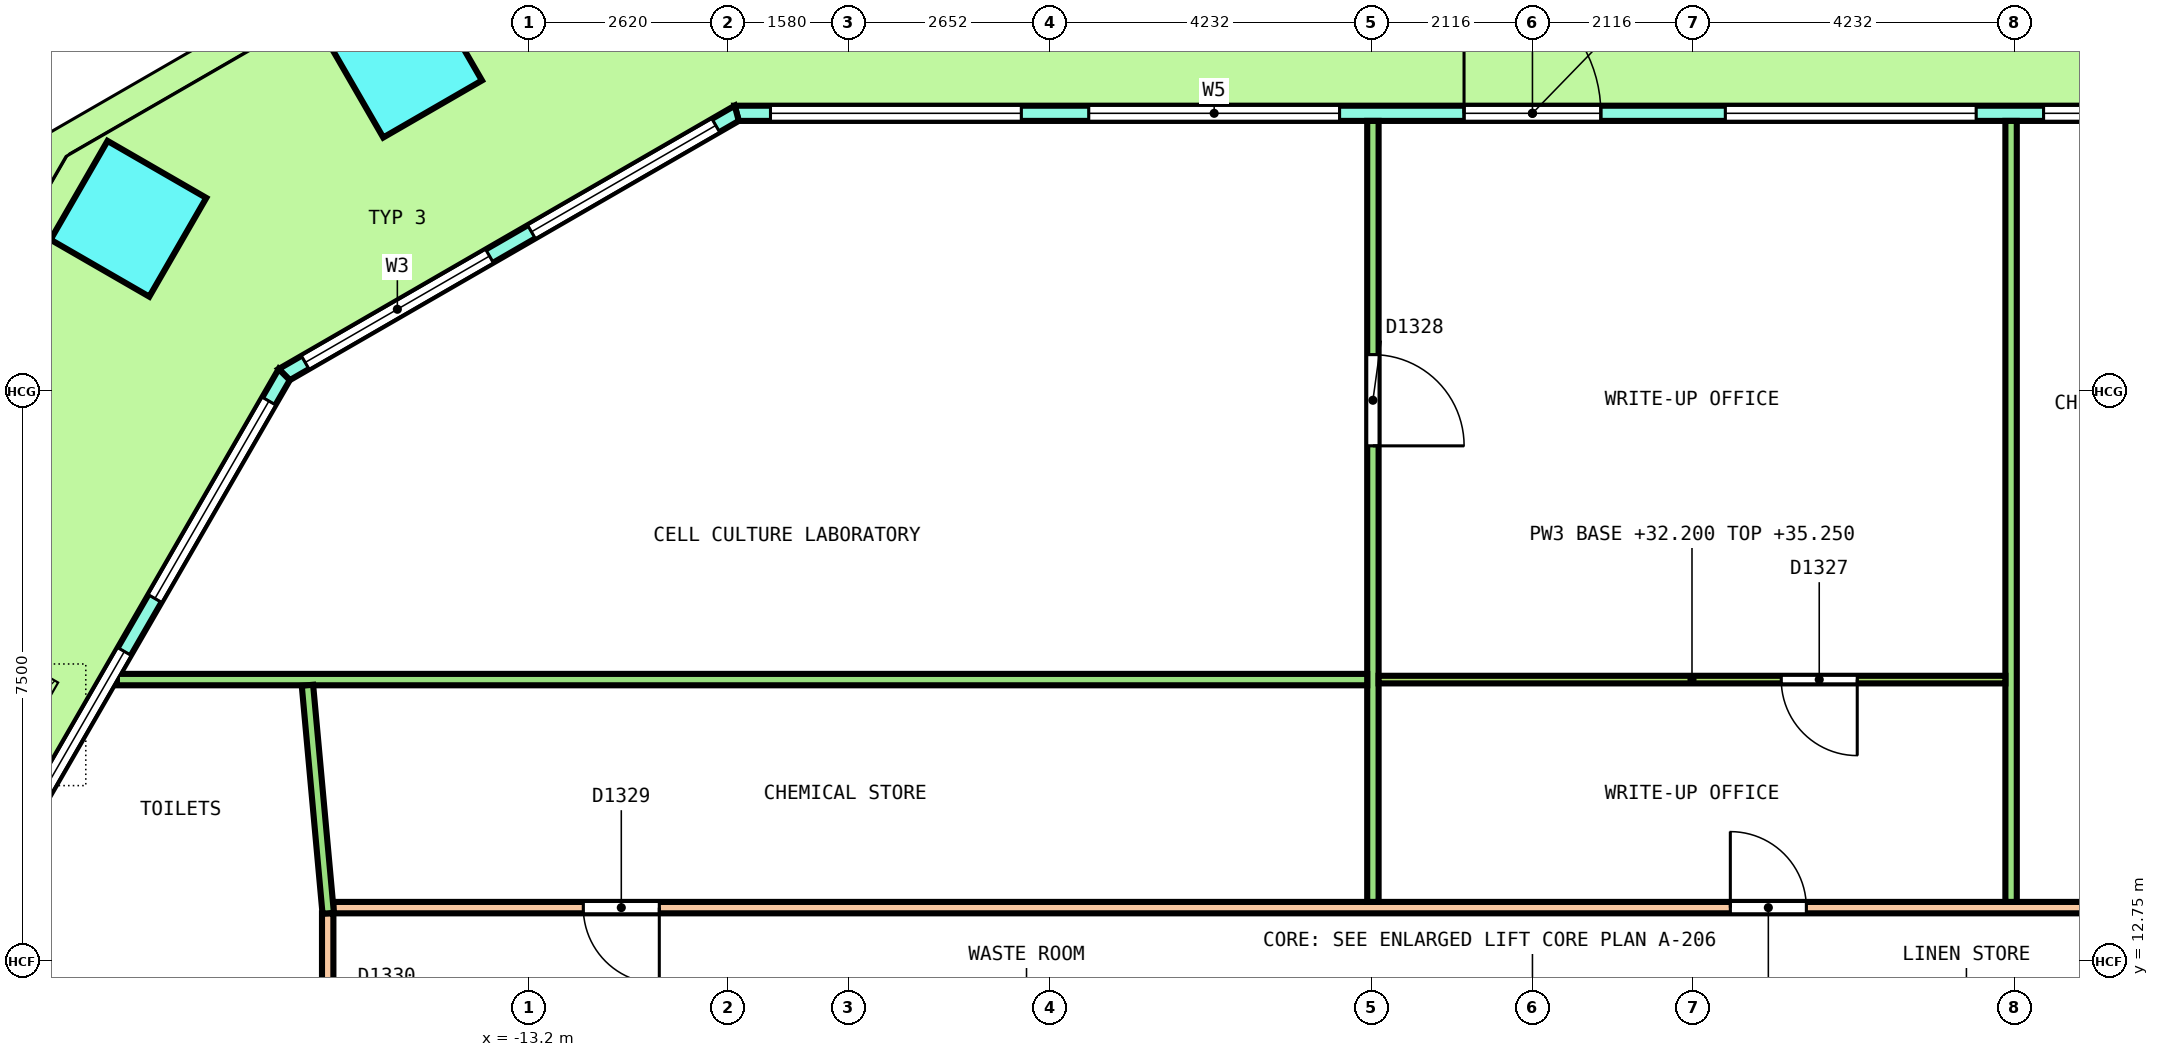
"""IFC4 building model, lengths in metres.
Left out: names, types, materials, properties, quantities, classifications, styles, units other than length and angle.
Written with IfcOpenShell. Run it as: python <this file> out.ifc"""

import sys

from ifc_helpers import new_model, si_unit, direction, frame, frame_2d, origin, origin_2d, place, context, subcontext, project, spatial, polyline, rectangle, outline, extrude, element, fill, save


model = new_model("IFC4")
c1 = context("Model", 3, precision=1e-05, world=origin(), true_north=direction((0.0, 1.0)))
c2 = subcontext(c1, "Body", "Model", "MODEL_VIEW")
j1 = project(units=[si_unit("LENGTHUNIT", "METRE"), si_unit("PLANEANGLEUNIT", "RADIAN")], contexts=[c1])
p1 = place(None, origin())
s1 = spatial("IfcSite", under=j1, at=p1, CompositionType="ELEMENT")
p2 = place(p1, origin())
s2 = spatial("IfcBuilding", under=s1, at=p2, CompositionType="ELEMENT")
p3 = place(p2, frame((0.0, 0.0, 32.2)))
s3 = spatial("IfcBuildingStorey", under=s2, at=p3, CompositionType="ELEMENT", Elevation=32.2)
for number, where, z_axis, x_axis in (
    (1, (-14.845, 24.606, 0.0), (-0.036, 0.0, 0.999), (-0.865, -0.5, -0.031)),
    (2, (-18.472, 22.512, 0.0), (-0.036, 0.0, 0.999), (-0.499, -0.866, -0.018)),
):
    element("IfcColumn", number, at=place(p3, frame(where, z_axis=z_axis, x_axis=x_axis)), inside=s3, PredefinedType="COLUMN", context=c2, shape_type="SweptSolid", body=[
        extrude(rectangle(XDim=1.5, YDim=1.5, at=origin_2d()), origin(), (0.0, 0.0, 1.0), 4.053),
    ])
p4 = place(p3, frame((10.468, 23.9, 0.0), z_axis=(0.0, 0.0, 1.0), x_axis=(-1.0, 0.0, 0.0)))
e3 = element("IfcWall", 3, at=p4, inside=s3, PredefinedType="SOLIDWALL", context=c2, shape_type="SweptSolid", body=[
    extrude(outline(polyline([(-0.027, -0.1), (1.023, -0.1), (2.072, -0.1), (3.122, -0.1), (4.171, -0.1), (5.221, -0.1), (6.27, -0.1), (7.32, -0.1), (8.369, -0.1), (9.419, -0.1), (10.468, -0.1), (11.518, -0.1), (12.567, -0.1), (13.617, -0.1), (14.666, -0.1), (15.716, -0.1), (16.765, -0.1), (17.815, -0.1), (18.864, -0.1), (19.914, -0.1), (20.963, -0.1), (20.91, 0.1), (19.865, 0.1), (18.821, 0.1), (17.777, 0.1), (16.733, 0.1), (15.689, 0.1), (14.645, 0.1), (13.601, 0.1), (12.557, 0.1), (11.512, 0.1), (10.468, 0.1), (9.424, 0.1), (8.38, 0.1), (7.336, 0.1), (6.292, 0.1), (5.248, 0.1), (4.203, 0.1), (3.159, 0.1), (2.115, 0.1), (1.071, 0.1), (0.027, 0.1), (-0.027, -0.1)])), origin(), (0.0, 0.0, 1.0), 4.1),
])
p5 = place(p4, frame((0.444, 0.0, 0.1)))
e4 = element("IfcOpeningElement", 4, at=p5, cuts=e3, PredefinedType="OPENING", context=c2, shape_type="SweptSolid", body=[
    extrude(rectangle(XDim=3.3, YDim=2.9, at=frame_2d((1.65, 1.45))), frame((0.0, 0.11, 0.0), z_axis=(0.0, -1.0, 0.0), x_axis=(1.0, 0.0, 0.0)), (0.0, 0.0, 1.0), 0.22),
])
p6 = place(p4, frame((4.631, 0.0, 0.1)))
e5 = element("IfcOpeningElement", 5, at=p6, cuts=e3, PredefinedType="OPENING", context=c2, shape_type="SweptSolid", body=[
    extrude(rectangle(XDim=3.3, YDim=2.9, at=frame_2d((1.65, 1.45))), frame((0.0, 0.11, 0.0), z_axis=(0.0, -1.0, 0.0), x_axis=(1.0, 0.0, 0.0)), (0.0, 0.0, 1.0), 0.22),
])
p7 = place(p4, frame((9.568, 0.0, 0.0)))
e6 = element("IfcOpeningElement", 6, at=p7, cuts=e3, PredefinedType="OPENING", context=c2, shape_type="SweptSolid", body=[
    extrude(rectangle(XDim=1.8, YDim=2.4, at=frame_2d((0.9, 1.2))), frame((0.0, 0.11, 0.0), z_axis=(0.0, -1.0, 0.0), x_axis=(1.0, 0.0, 0.0)), (0.0, 0.0, 1.0), 0.22),
])
p8 = place(p4, frame((9.568, 0.0, 2.55)))
e7 = element("IfcOpeningElement", 7, at=p8, cuts=e3, PredefinedType="OPENING", context=c2, shape_type="SweptSolid", body=[
    extrude(rectangle(XDim=1.8, YDim=0.45, at=frame_2d((0.9, 0.225))), frame((0.0, 0.11, 0.0), z_axis=(0.0, -1.0, 0.0), x_axis=(1.0, 0.0, 0.0)), (0.0, 0.0, 1.0), 0.22),
])
p9 = place(p4, frame((13.006, 0.0, 0.1)))
e8 = element("IfcOpeningElement", 8, at=p9, cuts=e3, PredefinedType="OPENING", context=c2, shape_type="SweptSolid", body=[
    extrude(rectangle(XDim=3.3, YDim=2.9, at=frame_2d((1.65, 1.45))), frame((0.0, 0.11, 0.0), z_axis=(0.0, -1.0, 0.0), x_axis=(1.0, 0.0, 0.0)), (0.0, 0.0, 1.0), 0.22),
])
p10 = place(p4, frame((17.193, 0.0, 0.1)))
e9 = element("IfcOpeningElement", 9, at=p10, cuts=e3, PredefinedType="OPENING", context=c2, shape_type="SweptSolid", body=[
    extrude(rectangle(XDim=3.3, YDim=2.9, at=frame_2d((1.65, 1.45))), frame((0.0, 0.11, 0.0), z_axis=(0.0, -1.0, 0.0), x_axis=(1.0, 0.0, 0.0)), (0.0, 0.0, 1.0), 0.22),
])
p11 = place(p3, frame((-10.468, 23.9, 0.0), z_axis=(0.0, 0.0, 1.0), x_axis=(-0.866029458321, -0.49999297727, 0.0)))
e10 = element("IfcWall", 10, at=p11, inside=s3, PredefinedType="SOLIDWALL", context=c2, shape_type="SweptSolid", body=[
    extrude(outline(polyline([(-0.027, -0.1), (1.128, -0.1), (2.282, -0.1), (3.437, -0.1), (4.592, -0.1), (5.747, -0.1), (6.901, -0.1), (6.848, 0.1), (5.711, 0.1), (4.574, 0.1), (3.437, 0.1), (2.301, 0.1), (1.164, 0.1), (0.027, 0.1), (-0.027, -0.1)])), origin(), (0.0, 0.0, 1.0), 4.1),
])
p12 = place(p11, frame((0.319, 0.0, 0.1)))
e11 = element("IfcOpeningElement", 11, at=p12, cuts=e10, PredefinedType="OPENING", context=c2, shape_type="SweptSolid", body=[
    extrude(rectangle(XDim=2.8, YDim=2.9, at=frame_2d((1.4, 1.45))), frame((0.0, 0.11, 0.0), z_axis=(0.0, -1.0, 0.0), x_axis=(1.0, 0.0, 0.0)), (0.0, 0.0, 1.0), 0.22),
])
p13 = place(p11, frame((3.756, 0.0, 0.1)))
e12 = element("IfcOpeningElement", 12, at=p13, cuts=e10, PredefinedType="OPENING", context=c2, shape_type="SweptSolid", body=[
    extrude(rectangle(XDim=2.8, YDim=2.9, at=frame_2d((1.4, 1.45))), frame((0.0, 0.11, 0.0), z_axis=(0.0, -1.0, 0.0), x_axis=(1.0, 0.0, 0.0)), (0.0, 0.0, 1.0), 0.22),
])
p14 = place(p3, frame((-16.422, 20.463, 0.0), z_axis=(0.0, 0.0, 1.0), x_axis=(-0.500001707189, -0.866024418136, 0.0)))
e13 = element("IfcWall", 13, at=p14, inside=s3, PredefinedType="SOLIDWALL", context=c2, shape_type="SweptSolid", body=[
    extrude(outline(polyline([(-0.027, -0.1), (0.977, -0.1), (1.981, -0.1), (2.985, -0.1), (3.989, -0.1), (4.993, -0.1), (5.997, -0.1), (7.0, -0.1), (8.004, -0.1), (9.008, -0.1), (10.012, -0.1), (11.016, -0.1), (12.02, -0.1), (13.024, -0.1), (14.028, -0.1), (15.032, -0.1), (16.036, -0.1), (17.04, -0.1), (18.043, -0.1), (19.047, -0.1), (18.994, 0.1), (17.995, 0.1), (16.997, 0.1), (15.999, 0.1), (15.001, 0.1), (14.002, 0.1), (13.004, 0.1), (12.006, 0.1), (11.008, 0.1), (10.009, 0.1), (9.011, 0.1), (8.013, 0.1), (7.015, 0.1), (6.016, 0.1), (5.018, 0.1), (4.02, 0.1), (3.022, 0.1), (2.023, 0.1), (1.025, 0.1), (0.027, 0.1), (-0.027, -0.1)])), origin(), (0.0, 0.0, 1.0), 4.1),
])
p15 = place(p14, frame((0.402, 0.0, 0.1)))
e14 = element("IfcOpeningElement", 14, at=p15, cuts=e13, PredefinedType="OPENING", context=c2, shape_type="SweptSolid", body=[
    extrude(rectangle(XDim=3.0, YDim=2.9, at=frame_2d((1.5, 1.45))), frame((0.0, 0.11, 0.0), z_axis=(0.0, -1.0, 0.0), x_axis=(1.0, 0.0, 0.0)), (0.0, 0.0, 1.0), 0.22),
])
p16 = place(p14, frame((4.206, 0.0, 0.1)))
e15 = element("IfcOpeningElement", 15, at=p16, cuts=e13, PredefinedType="OPENING", context=c2, shape_type="SweptSolid", body=[
    extrude(rectangle(XDim=3.0, YDim=2.9, at=frame_2d((1.5, 1.45))), frame((0.0, 0.11, 0.0), z_axis=(0.0, -1.0, 0.0), x_axis=(1.0, 0.0, 0.0)), (0.0, 0.0, 1.0), 0.22),
])
p17 = place(p14, frame((8.61, 0.0, 0.0)))
e16 = element("IfcOpeningElement", 16, at=p17, cuts=e13, PredefinedType="OPENING", context=c2, shape_type="SweptSolid", body=[
    extrude(rectangle(XDim=1.8, YDim=2.4, at=frame_2d((0.9, 1.2))), frame((0.0, 0.11, 0.0), z_axis=(0.0, -1.0, 0.0), x_axis=(1.0, 0.0, 0.0)), (0.0, 0.0, 1.0), 0.22),
])
p18 = place(p14, frame((8.61, 0.0, 2.55)))
e17 = element("IfcOpeningElement", 17, at=p18, cuts=e13, PredefinedType="OPENING", context=c2, shape_type="SweptSolid", body=[
    extrude(rectangle(XDim=1.8, YDim=0.45, at=frame_2d((0.9, 0.225))), frame((0.0, 0.11, 0.0), z_axis=(0.0, -1.0, 0.0), x_axis=(1.0, 0.0, 0.0)), (0.0, 0.0, 1.0), 0.22),
])
p19 = place(p14, frame((11.814, 0.0, 0.1)))
e18 = element("IfcOpeningElement", 18, at=p19, cuts=e13, PredefinedType="OPENING", context=c2, shape_type="SweptSolid", body=[
    extrude(rectangle(XDim=3.0, YDim=2.9, at=frame_2d((1.5, 1.45))), frame((0.0, 0.11, 0.0), z_axis=(0.0, -1.0, 0.0), x_axis=(1.0, 0.0, 0.0)), (0.0, 0.0, 1.0), 0.22),
])
p20 = place(p14, frame((15.618, 0.0, 0.1)))
e19 = element("IfcOpeningElement", 19, at=p20, cuts=e13, PredefinedType="OPENING", context=c2, shape_type="SweptSolid", body=[
    extrude(rectangle(XDim=3.0, YDim=2.9, at=frame_2d((1.5, 1.45))), frame((0.0, 0.11, 0.0), z_axis=(0.0, -1.0, 0.0), x_axis=(1.0, 0.0, 0.0)), (0.0, 0.0, 1.0), 0.22),
])
p21 = place(p3, frame((-15.775, 13.45, 0.0), z_axis=(0.0, 0.0, 1.0), x_axis=(1.0, 0.0, 0.0)))
e20 = element("IfcWall", 20, at=p21, inside=s3, PredefinedType="PARTITIONING", context=c2, shape_type="SweptSolid", body=[
    extrude(rectangle(XDim=31.575, YDim=0.15, at=frame_2d((15.788, 0.0))), origin(), (0.0, 0.0, 1.0), 3.05),
])
p22 = place(p21, frame((28.448, 0.0, 0.0)))
e21 = element("IfcOpeningElement", 21, at=p22, cuts=e20, PredefinedType="OPENING", context=c2, shape_type="SweptSolid", body=[
    extrude(rectangle(XDim=1.0, YDim=2.1, at=frame_2d((0.5, 1.05))), frame((0.0, 0.085, 0.0), z_axis=(0.0, -1.0, 0.0), x_axis=(1.0, 0.0, 0.0)), (0.0, 0.0, 1.0), 0.17),
])
p23 = place(p21, frame((24.146, 0.0, 0.0)))
e22 = element("IfcOpeningElement", 22, at=p23, cuts=e20, PredefinedType="OPENING", context=c2, shape_type="SweptSolid", body=[
    extrude(rectangle(XDim=1.2, YDim=2.1, at=frame_2d((0.6, 1.05))), frame((0.0, 0.085, 0.0), z_axis=(0.0, -1.0, 0.0), x_axis=(1.0, 0.0, 0.0)), (0.0, 0.0, 1.0), 0.17),
])
p24 = place(p21, frame((18.378, 0.0, 0.0)))
e23 = element("IfcOpeningElement", 23, at=p24, cuts=e20, PredefinedType="OPENING", context=c2, shape_type="SweptSolid", body=[
    extrude(rectangle(XDim=1.0, YDim=2.1, at=frame_2d((0.5, 1.05))), frame((0.0, 0.085, 0.0), z_axis=(0.0, -1.0, 0.0), x_axis=(1.0, 0.0, 0.0)), (0.0, 0.0, 1.0), 0.17),
])
p25 = place(p21, frame((3.288, 0.0, 0.0)))
e24 = element("IfcOpeningElement", 24, at=p25, cuts=e20, PredefinedType="OPENING", context=c2, shape_type="SweptSolid", body=[
    extrude(rectangle(XDim=1.0, YDim=2.1, at=frame_2d((0.5, 1.05))), frame((0.0, 0.085, 0.0), z_axis=(0.0, -1.0, 0.0), x_axis=(1.0, 0.0, 0.0)), (0.0, 0.0, 1.0), 0.17),
])
p26 = place(p3, frame((-15.85, -13.375, 0.0), z_axis=(0.0, 0.0, 1.0), x_axis=(0.0, 1.0, 0.0)))
e25 = element("IfcWall", 25, at=p26, inside=s3, PredefinedType="PARTITIONING", context=c2, shape_type="SweptSolid", body=[
    extrude(rectangle(XDim=26.75, YDim=0.15, at=frame_2d((13.375, 0.0))), origin(), (0.0, 0.0, 1.0), 3.05),
])
p27 = place(p26, frame((24.631, 0.0, 0.0)))
e26 = element("IfcOpeningElement", 26, at=p27, cuts=e25, PredefinedType="OPENING", context=c2, shape_type="SweptSolid", body=[
    extrude(rectangle(XDim=1.0, YDim=2.1, at=frame_2d((0.5, 1.05))), frame((0.0, 0.085, 0.0), z_axis=(0.0, -1.0, 0.0), x_axis=(1.0, 0.0, 0.0)), (0.0, 0.0, 1.0), 0.17),
])
p28 = place(p26, frame((16.371, 0.0, 0.0)))
e27 = element("IfcOpeningElement", 27, at=p28, cuts=e25, PredefinedType="OPENING", context=c2, shape_type="SweptSolid", body=[
    extrude(rectangle(XDim=1.0, YDim=2.1, at=frame_2d((0.5, 1.05))), frame((0.0, 0.085, 0.0), z_axis=(0.0, -1.0, 0.0), x_axis=(1.0, 0.0, 0.0)), (0.0, 0.0, 1.0), 0.17),
])
p29 = place(p26, frame((6.705, 0.0, 0.0)))
e28 = element("IfcOpeningElement", 28, at=p29, cuts=e25, PredefinedType="OPENING", context=c2, shape_type="SweptSolid", body=[
    extrude(rectangle(XDim=1.0, YDim=2.1, at=frame_2d((0.5, 1.05))), frame((0.0, 0.085, 0.0), z_axis=(0.0, -1.0, 0.0), x_axis=(1.0, 0.0, 0.0)), (0.0, 0.0, 1.0), 0.17),
])
p30 = place(p3, frame((6.297, 13.525, 0.0), z_axis=(0.0, 0.0, 1.0), x_axis=(0.0, 1.0, 0.0)))
e29 = element("IfcWall", 29, at=p30, inside=s3, PredefinedType="PARTITIONING", context=c2, shape_type="SweptSolid", body=[
    extrude(rectangle(XDim=10.275, YDim=0.15, at=frame_2d((5.138, 0.0))), origin(), (0.0, 0.0, 1.0), 3.05),
])
p31 = place(p3, frame((-2.099, 13.525, 0.0), z_axis=(0.0, 0.0, 1.0), x_axis=(0.0, 1.0, 0.0)))
e30 = element("IfcWall", 30, at=p31, inside=s3, PredefinedType="PARTITIONING", context=c2, shape_type="SweptSolid", body=[
    extrude(rectangle(XDim=10.275, YDim=0.15, at=frame_2d((5.138, 0.0))), origin(), (0.0, 0.0, 1.0), 3.05),
])
p32 = place(p31, frame((6.0, 0.0, 0.0)))
e31 = element("IfcOpeningElement", 31, at=p32, cuts=e30, PredefinedType="OPENING", context=c2, shape_type="SweptSolid", body=[
    extrude(rectangle(XDim=1.2, YDim=2.1, at=frame_2d((0.6, 1.05))), frame((0.0, 0.085, 0.0), z_axis=(0.0, -1.0, 0.0), x_axis=(1.0, 0.0, 0.0)), (0.0, 0.0, 1.0), 0.17),
])
p33 = place(p3, frame((-18.623, 16.45, 0.0), z_axis=(0.0, 0.0, 1.0), x_axis=(1.0, 0.0, 0.0)))
e32 = element("IfcWall", 32, at=p33, inside=s3, PredefinedType="PARTITIONING", context=c2, shape_type="SweptSolid", body=[
    extrude(rectangle(XDim=16.449, YDim=0.15, at=frame_2d((8.225, 0.0))), origin(), (0.0, 0.0, 1.0), 3.05),
])
p34 = place(p3, frame((-16.116, 16.375, 0.0), z_axis=(0.0, 0.0, 1.0), x_axis=(0.09060881957, -0.995886560717, 0.0)))
e33 = element("IfcWall", 33, at=p34, inside=s3, PredefinedType="PARTITIONING", context=c2, shape_type="SweptSolid", body=[
    extrude(rectangle(XDim=3.012, YDim=0.15, at=frame_2d((1.506, 0.0))), origin(), (0.0, 0.0, 1.0), 3.05),
])
p35 = place(p3, frame((-2.024, 16.45, 0.0), z_axis=(0.0, 0.0, 1.0), x_axis=(1.0, 0.0, 0.0)))
e34 = element("IfcWall", 34, at=p35, inside=s3, PredefinedType="PARTITIONING", context=c2, shape_type="SweptSolid", body=[
    extrude(rectangle(XDim=8.246, YDim=0.1, at=frame_2d((4.123, 0.0))), origin(), (0.0, 0.0, 1.0), 3.05),
])
p36 = place(p35, frame((5.297, 0.0, 0.0)))
e35 = element("IfcOpeningElement", 35, at=p36, cuts=e34, PredefinedType="OPENING", context=c2, shape_type="SweptSolid", body=[
    extrude(rectangle(XDim=1.0, YDim=2.1, at=frame_2d((0.5, 1.05))), frame((0.0, 0.06, 0.0), z_axis=(0.0, -1.0, 0.0), x_axis=(1.0, 0.0, 0.0)), (0.0, 0.0, 1.0), 0.12),
])
p37 = place(p5, origin())
e36 = element("IfcWindow", 36, at=p37, inside=s3, PartitioningType="SINGLE_PANEL", PredefinedType="WINDOW", context=c2, shape_type="SweptSolid", body=[
    extrude(rectangle(XDim=3.3, YDim=2.9, at=frame_2d((1.65, 1.45))), frame((0.0, 0.03, 0.0), z_axis=(0.0, -1.0, 0.0), x_axis=(1.0, 0.0, 0.0)), (0.0, 0.0, 1.0), 0.06),
])
fill(e4, e36)
p38 = place(p6, origin())
e37 = element("IfcWindow", 37, at=p38, inside=s3, PartitioningType="SINGLE_PANEL", PredefinedType="WINDOW", context=c2, shape_type="SweptSolid", body=[
    extrude(rectangle(XDim=3.3, YDim=2.9, at=frame_2d((1.65, 1.45))), frame((0.0, 0.03, 0.0), z_axis=(0.0, -1.0, 0.0), x_axis=(1.0, 0.0, 0.0)), (0.0, 0.0, 1.0), 0.06),
])
fill(e5, e37)
p39 = place(p7, origin())
e38 = element("IfcDoor", 38, at=p39, inside=s3, OperationType="DOUBLE_DOOR_SINGLE_SWING", PredefinedType="DOOR", context=c2, shape_type="SweptSolid", body=[
    extrude(rectangle(XDim=1.8, YDim=2.4, at=frame_2d((0.9, 1.2))), frame((0.0, 0.025, 0.0), z_axis=(0.0, -1.0, 0.0), x_axis=(1.0, 0.0, 0.0)), (0.0, 0.0, 1.0), 0.05),
])
fill(e6, e38)
p40 = place(p8, origin())
e39 = element("IfcWindow", 39, at=p40, inside=s3, PartitioningType="SINGLE_PANEL", PredefinedType="WINDOW", context=c2, shape_type="SweptSolid", body=[
    extrude(rectangle(XDim=1.8, YDim=0.45, at=frame_2d((0.9, 0.225))), frame((0.0, 0.03, 0.0), z_axis=(0.0, -1.0, 0.0), x_axis=(1.0, 0.0, 0.0)), (0.0, 0.0, 1.0), 0.06),
])
fill(e7, e39)
p41 = place(p9, origin())
e40 = element("IfcWindow", 40, at=p41, inside=s3, PartitioningType="SINGLE_PANEL", PredefinedType="WINDOW", context=c2, shape_type="SweptSolid", body=[
    extrude(rectangle(XDim=3.3, YDim=2.9, at=frame_2d((1.65, 1.45))), frame((0.0, 0.03, 0.0), z_axis=(0.0, -1.0, 0.0), x_axis=(1.0, 0.0, 0.0)), (0.0, 0.0, 1.0), 0.06),
])
fill(e8, e40)
p42 = place(p10, origin())
e41 = element("IfcWindow", 41, at=p42, inside=s3, PartitioningType="SINGLE_PANEL", PredefinedType="WINDOW", context=c2, shape_type="SweptSolid", body=[
    extrude(rectangle(XDim=3.3, YDim=2.9, at=frame_2d((1.65, 1.45))), frame((0.0, 0.03, 0.0), z_axis=(0.0, -1.0, 0.0), x_axis=(1.0, 0.0, 0.0)), (0.0, 0.0, 1.0), 0.06),
])
fill(e9, e41)
p43 = place(p12, origin())
e42 = element("IfcWindow", 42, at=p43, inside=s3, PartitioningType="SINGLE_PANEL", PredefinedType="WINDOW", context=c2, shape_type="SweptSolid", body=[
    extrude(rectangle(XDim=2.8, YDim=2.9, at=frame_2d((1.4, 1.45))), frame((0.0, 0.03, 0.0), z_axis=(0.0, -1.0, 0.0), x_axis=(1.0, 0.0, 0.0)), (0.0, 0.0, 1.0), 0.06),
])
fill(e11, e42)
p44 = place(p13, origin())
e43 = element("IfcWindow", 43, at=p44, inside=s3, PartitioningType="SINGLE_PANEL", PredefinedType="WINDOW", context=c2, shape_type="SweptSolid", body=[
    extrude(rectangle(XDim=2.8, YDim=2.9, at=frame_2d((1.4, 1.45))), frame((0.0, 0.03, 0.0), z_axis=(0.0, -1.0, 0.0), x_axis=(1.0, 0.0, 0.0)), (0.0, 0.0, 1.0), 0.06),
])
fill(e12, e43)
p45 = place(p15, origin())
e44 = element("IfcWindow", 44, at=p45, inside=s3, PartitioningType="SINGLE_PANEL", PredefinedType="WINDOW", context=c2, shape_type="SweptSolid", body=[
    extrude(rectangle(XDim=3.0, YDim=2.9, at=frame_2d((1.5, 1.45))), frame((0.0, 0.03, 0.0), z_axis=(0.0, -1.0, 0.0), x_axis=(1.0, 0.0, 0.0)), (0.0, 0.0, 1.0), 0.06),
])
fill(e14, e44)
p46 = place(p16, origin())
e45 = element("IfcWindow", 45, at=p46, inside=s3, PartitioningType="SINGLE_PANEL", PredefinedType="WINDOW", context=c2, shape_type="SweptSolid", body=[
    extrude(rectangle(XDim=3.0, YDim=2.9, at=frame_2d((1.5, 1.45))), frame((0.0, 0.03, 0.0), z_axis=(0.0, -1.0, 0.0), x_axis=(1.0, 0.0, 0.0)), (0.0, 0.0, 1.0), 0.06),
])
fill(e15, e45)
p47 = place(p24, origin())
e46 = element("IfcDoor", 46, at=p47, inside=s3, OperationType="SINGLE_SWING_RIGHT", PredefinedType="DOOR", context=c2, shape_type="SweptSolid", body=[
    extrude(rectangle(XDim=1.0, YDim=2.1, at=frame_2d((0.5, 1.05))), frame((0.0, 0.025, 0.0), z_axis=(0.0, -1.0, 0.0), x_axis=(1.0, 0.0, 0.0)), (0.0, 0.0, 1.0), 0.05),
])
fill(e23, e46)
p48 = place(p36, origin())
e47 = element("IfcDoor", 47, at=p48, inside=s3, OperationType="SINGLE_SWING_LEFT", PredefinedType="DOOR", context=c2, shape_type="SweptSolid", body=[
    extrude(rectangle(XDim=1.0, YDim=2.1, at=frame_2d((0.5, 1.05))), frame((0.0, 0.025, 0.0), z_axis=(0.0, -1.0, 0.0), x_axis=(1.0, 0.0, 0.0)), (0.0, 0.0, 1.0), 0.05),
])
fill(e35, e47)
p49 = place(p32, origin())
e48 = element("IfcDoor", 48, at=p49, inside=s3, OperationType="DOUBLE_DOOR_SINGLE_SWING", PredefinedType="DOOR", context=c2, shape_type="SweptSolid", body=[
    extrude(rectangle(XDim=1.2, YDim=2.1, at=frame_2d((0.6, 1.05))), frame((0.0, 0.025, 0.0), z_axis=(0.0, -1.0, 0.0), x_axis=(1.0, 0.0, 0.0)), (0.0, 0.0, 1.0), 0.05),
])
fill(e31, e48)
p50 = place(p25, origin())
e49 = element("IfcDoor", 49, at=p50, inside=s3, OperationType="SINGLE_SWING_RIGHT", PredefinedType="DOOR", context=c2, shape_type="SweptSolid", body=[
    extrude(rectangle(XDim=1.0, YDim=2.1, at=frame_2d((0.5, 1.05))), frame((0.0, 0.025, 0.0), z_axis=(0.0, -1.0, 0.0), x_axis=(1.0, 0.0, 0.0)), (0.0, 0.0, 1.0), 0.05),
])
fill(e24, e49)
save(model, sys.argv[1])
